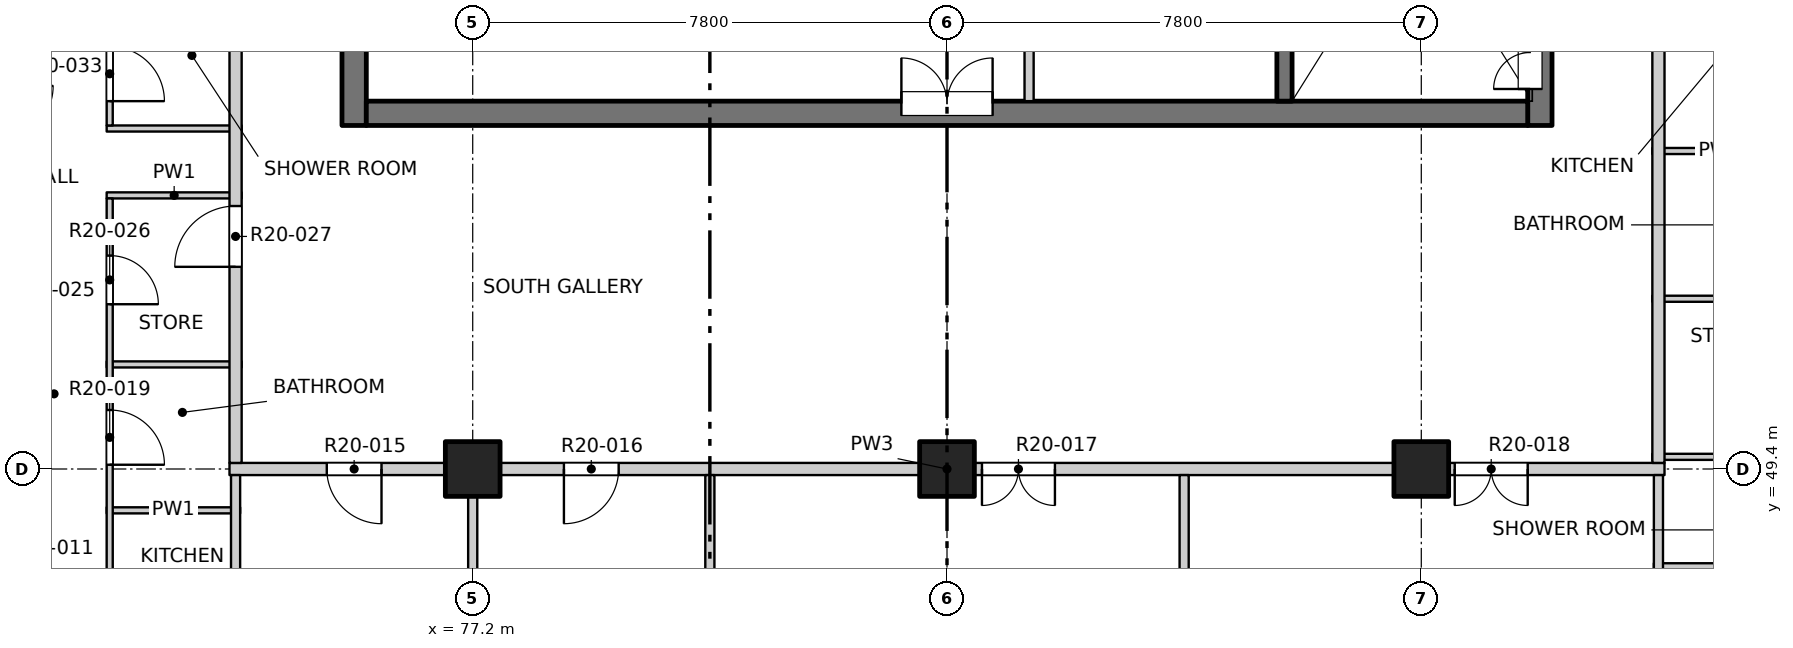
"""IFC4 building model, lengths in metres.
Left out: names, types, materials, properties, quantities, classifications, styles, units other than length and angle.
Written with IfcOpenShell. Run it as: python <this file> out.ifc"""

import sys

from ifc_helpers import new_model, si_unit, direction, frame, frame_2d, origin, origin_2d, place, context, subcontext, project, spatial, rectangle, extrude, element, fill, save


model = new_model("IFC4")
c1 = context("Model", 3, precision=1e-05, world=origin(), true_north=direction((0.0, 1.0)))
c2 = subcontext(c1, "Body", "Model", "MODEL_VIEW")
j1 = project(units=[si_unit("LENGTHUNIT", "METRE"), si_unit("PLANEANGLEUNIT", "RADIAN")], contexts=[c1])
p1 = place(None, origin())
s1 = spatial("IfcSite", under=j1, at=p1, CompositionType="ELEMENT")
p2 = place(p1, origin())
s2 = spatial("IfcBuilding", under=s1, at=p2, CompositionType="ELEMENT")
p3 = place(p2, frame((0.0, 0.0, 204.1)))
s3 = spatial("IfcBuildingStorey", under=s2, at=p3, CompositionType="ELEMENT", Elevation=204.1)
for number, where, z_axis, x_axis in (
    (1, (77.2, 49.4, -0.25), (0.0, 0.0, 1.0), (1.0, 0.0, 0.0)),
    (2, (85.0, 49.4, -0.25), (0.0, 0.0, 1.0), (1.0, 0.0, 0.0)),
    (3, (92.8, 49.4, -0.25), (0.0, 0.0, 1.0), (1.0, 0.0, 0.0)),
):
    element("IfcColumn", number, at=place(p3, frame(where, z_axis=z_axis, x_axis=x_axis)), inside=s3, PredefinedType="COLUMN", context=c2, shape_type="SweptSolid", body=[
        extrude(rectangle(XDim=0.9, YDim=0.9, at=origin_2d()), origin(), (0.0, 0.0, 1.0), 3.4),
    ])
p4 = place(p3, frame((75.25, 55.05, -0.25), z_axis=(0.0, 0.0, 1.0), x_axis=(0.0, 1.0, 0.0)))
e4 = element("IfcWall", 4, at=p4, inside=s3, PredefinedType="SOLIDWALL", context=c2, shape_type="SweptSolid", body=[
    extrude(rectangle(XDim=22.25, YDim=0.4, at=frame_2d((11.125, 0.0))), origin(), (0.0, 0.0, 1.0), 3.4),
])
p5 = place(p4, frame((7.4, 0.0, 0.25)))
e5 = element("IfcOpeningElement", 5, at=p5, cuts=e4, PredefinedType="OPENING", context=c2, shape_type="SweptSolid", body=[
    extrude(rectangle(XDim=0.9, YDim=2.1, at=frame_2d((0.45, 1.05))), frame((0.0, 0.21, 0.0), z_axis=(0.0, -1.0, 0.0), x_axis=(1.0, 0.0, 0.0)), (0.0, 0.0, 1.0), 0.42),
])
p6 = place(p4, frame((13.7, 0.0, 0.25)))
e6 = element("IfcOpeningElement", 6, at=p6, cuts=e4, PredefinedType="OPENING", context=c2, shape_type="SweptSolid", body=[
    extrude(rectangle(XDim=0.9, YDim=2.1, at=frame_2d((0.45, 1.05))), frame((0.0, 0.21, 0.0), z_axis=(0.0, -1.0, 0.0), x_axis=(1.0, 0.0, 0.0)), (0.0, 0.0, 1.0), 0.42),
])
p7 = place(p4, frame((20.0, 0.0, 0.25)))
e7 = element("IfcOpeningElement", 7, at=p7, cuts=e4, PredefinedType="OPENING", context=c2, shape_type="SweptSolid", body=[
    extrude(rectangle(XDim=0.9, YDim=2.1, at=frame_2d((0.45, 1.05))), frame((0.0, 0.21, 0.0), z_axis=(0.0, -1.0, 0.0), x_axis=(1.0, 0.0, 0.0)), (0.0, 0.0, 1.0), 0.42),
])
p8 = place(p3, frame((94.75, 55.05, -0.25), z_axis=(0.0, 0.0, 1.0), x_axis=(0.0, 1.0, 0.0)))
e8 = element("IfcWall", 8, at=p8, inside=s3, PredefinedType="SOLIDWALL", context=c2, shape_type="SweptSolid", body=[
    extrude(rectangle(XDim=6.9, YDim=0.4, at=frame_2d((3.45, 0.0))), origin(), (0.0, 0.0, 1.0), 3.4),
])
p9 = place(p8, frame((0.6, 0.0, 0.25)))
e9 = element("IfcOpeningElement", 9, at=p9, cuts=e8, PredefinedType="OPENING", context=c2, shape_type="SweptSolid", body=[
    extrude(rectangle(XDim=1.2, YDim=2.1, at=frame_2d((0.6, 1.05))), frame((0.0, 0.21, 0.0), z_axis=(0.0, -1.0, 0.0), x_axis=(1.0, 0.0, 0.0)), (0.0, 0.0, 1.0), 0.42),
])
p10 = place(p3, frame((75.45, 55.25, -0.25), z_axis=(0.0, 0.0, 1.0), x_axis=(1.0, 0.0, 0.0)))
e10 = element("IfcWall", 10, at=p10, inside=s3, PredefinedType="SOLIDWALL", context=c2, shape_type="SweptSolid", body=[
    extrude(rectangle(XDim=19.1, YDim=0.4, at=frame_2d((9.55, 0.0))), origin(), (0.0, 0.0, 1.0), 3.4),
])
p11 = place(p10, frame((8.8, 0.0, 0.25)))
e11 = element("IfcOpeningElement", 11, at=p11, cuts=e10, PredefinedType="OPENING", context=c2, shape_type="SweptSolid", body=[
    extrude(rectangle(XDim=1.5, YDim=2.1, at=frame_2d((0.75, 1.05))), frame((0.0, 0.21, 0.0), z_axis=(0.0, -1.0, 0.0), x_axis=(1.0, 0.0, 0.0)), (0.0, 0.0, 1.0), 0.42),
])
p12 = place(p3, frame((90.55, 55.45, -0.25), z_axis=(0.0, 0.0, 1.0), x_axis=(0.0, 1.0, 0.0)))
e12 = element("IfcWall", 12, at=p12, inside=s3, PredefinedType="SOLIDWALL", context=c2, shape_type="SweptSolid", body=[
    extrude(rectangle(XDim=6.5, YDim=0.25, at=frame_2d((3.25, 0.0))), origin(), (0.0, 0.0, 1.0), 3.4),
])
p13 = place(p3, frame((96.625, 47.8, 0.0), z_axis=(0.0, 0.0, 1.0), x_axis=(1.0, 0.0, 0.0)))
e13 = element("IfcWall", 13, at=p13, inside=s3, PredefinedType="PARTITIONING", context=c2, shape_type="SweptSolid", body=[
    extrude(rectangle(XDim=2.195, YDim=0.1, at=frame_2d((1.098, 0.0))), origin(), (0.0, 0.0, 1.0), 3.15),
])
p14 = place(p3, frame((71.18, 48.72, 0.0), z_axis=(0.0, 0.0, 1.0), x_axis=(1.0, 0.0, 0.0)))
e14 = element("IfcWall", 14, at=p14, inside=s3, PredefinedType="PARTITIONING", context=c2, shape_type="SweptSolid", body=[
    extrude(rectangle(XDim=2.195, YDim=0.1, at=frame_2d((1.097, 0.0))), origin(), (0.0, 0.0, 1.0), 3.15),
])
p15 = place(p3, frame((73.2, 49.4, 0.0), z_axis=(0.0, 0.0, 1.0), x_axis=(1.0, 0.0, 0.0)))
e15 = element("IfcWall", 15, at=p15, inside=s3, PredefinedType="PARTITIONING", context=c2, shape_type="SweptSolid", body=[
    extrude(rectangle(XDim=23.6, YDim=0.2, at=frame_2d((11.8, 0.0))), origin(), (0.0, 0.0, 1.0), 3.15),
])
p16 = place(p15, frame((1.6, 0.0, 0.0)))
e16 = element("IfcOpeningElement", 16, at=p16, cuts=e15, PredefinedType="OPENING", context=c2, shape_type="SweptSolid", body=[
    extrude(rectangle(XDim=0.9, YDim=2.1, at=frame_2d((0.45, 1.05))), frame((0.0, 0.11, 0.0), z_axis=(0.0, -1.0, 0.0), x_axis=(1.0, 0.0, 0.0)), (0.0, 0.0, 1.0), 0.22),
])
p17 = place(p15, frame((5.5, 0.0, 0.0)))
e17 = element("IfcOpeningElement", 17, at=p17, cuts=e15, PredefinedType="OPENING", context=c2, shape_type="SweptSolid", body=[
    extrude(rectangle(XDim=0.9, YDim=2.1, at=frame_2d((0.45, 1.05))), frame((0.0, 0.11, 0.0), z_axis=(0.0, -1.0, 0.0), x_axis=(1.0, 0.0, 0.0)), (0.0, 0.0, 1.0), 0.22),
])
p18 = place(p15, frame((12.375, 0.0, 0.0)))
e18 = element("IfcOpeningElement", 18, at=p18, cuts=e15, PredefinedType="OPENING", context=c2, shape_type="SweptSolid", body=[
    extrude(rectangle(XDim=1.2, YDim=2.1, at=frame_2d((0.6, 1.05))), frame((0.0, 0.11, 0.0), z_axis=(0.0, -1.0, 0.0), x_axis=(1.0, 0.0, 0.0)), (0.0, 0.0, 1.0), 0.22),
])
p19 = place(p15, frame((20.15, 0.0, 0.0)))
e19 = element("IfcOpeningElement", 19, at=p19, cuts=e15, PredefinedType="OPENING", context=c2, shape_type="SweptSolid", body=[
    extrude(rectangle(XDim=1.2, YDim=2.1, at=frame_2d((0.6, 1.05))), frame((0.0, 0.11, 0.0), z_axis=(0.0, -1.0, 0.0), x_axis=(1.0, 0.0, 0.0)), (0.0, 0.0, 1.0), 0.22),
])
for number, where, z_axis, x_axis in (
    (20, (96.6, 49.6, 0.0), (0.0, 0.0, 1.0), (1.0, 0.0, 0.0)),
    (21, (71.18, 51.12, 0.0), (0.0, 0.0, 1.0), (1.0, 0.0, 0.0)),
    (22, (96.6, 52.2, 0.0), (0.0, 0.0, 1.0), (1.0, 0.0, 0.0)),
    (23, (71.18, 53.9, 0.0), (0.0, 0.0, 1.0), (1.0, 0.0, 0.0)),
    (24, (96.6, 54.63, 0.0), (0.0, 0.0, 1.0), (1.0, 0.0, 0.0)),
    (25, (71.18, 55.0, 0.0), (0.0, 0.0, 1.0), (1.0, 0.0, 0.0)),
):
    element("IfcWall", number, at=place(p3, frame(where, z_axis=z_axis, x_axis=x_axis)), inside=s3, PredefinedType="PARTITIONING", context=c2, shape_type="SweptSolid", body=[
        extrude(rectangle(XDim=2.22, YDim=0.1, at=frame_2d((1.11, 0.0))), origin(), (0.0, 0.0, 1.0), 3.15),
    ])
p20 = place(p3, frame((71.23, 45.55, 0.0), z_axis=(0.0, 0.0, 1.0), x_axis=(0.0, 1.0, 0.0)))
e26 = element("IfcWall", 26, at=p20, inside=s3, PredefinedType="PARTITIONING", context=c2, shape_type="SweptSolid", body=[
    extrude(rectangle(XDim=8.3, YDim=0.1, at=frame_2d((4.15, 0.0))), origin(), (0.0, 0.0, 1.0), 3.15),
])
p21 = place(p20, frame((1.11, 0.0, 0.0)))
e27 = element("IfcOpeningElement", 27, at=p21, cuts=e26, PredefinedType="OPENING", context=c2, shape_type="SweptSolid", body=[
    extrude(rectangle(XDim=0.9, YDim=2.1, at=frame_2d((0.45, 1.05))), frame((0.0, 0.06, 0.0), z_axis=(0.0, -1.0, 0.0), x_axis=(1.0, 0.0, 0.0)), (0.0, 0.0, 1.0), 0.12),
])
p22 = place(p20, frame((3.92, 0.0, 0.0)))
e28 = element("IfcOpeningElement", 28, at=p22, cuts=e26, PredefinedType="OPENING", context=c2, shape_type="SweptSolid", body=[
    extrude(rectangle(XDim=0.9, YDim=2.1, at=frame_2d((0.45, 1.05))), frame((0.0, 0.06, 0.0), z_axis=(0.0, -1.0, 0.0), x_axis=(1.0, 0.0, 0.0)), (0.0, 0.0, 1.0), 0.12),
])
p23 = place(p20, frame((6.56, 0.0, 0.0)))
e29 = element("IfcOpeningElement", 29, at=p23, cuts=e26, PredefinedType="OPENING", context=c2, shape_type="SweptSolid", body=[
    extrude(rectangle(XDim=0.8, YDim=2.1, at=frame_2d((0.4, 1.05))), frame((0.0, 0.06, 0.0), z_axis=(0.0, -1.0, 0.0), x_axis=(1.0, 0.0, 0.0)), (0.0, 0.0, 1.0), 0.12),
])
p24 = place(p3, frame((71.23, 55.05, 0.0), z_axis=(0.0, 0.0, 1.0), x_axis=(0.0, 1.0, 0.0)))
e30 = element("IfcWall", 30, at=p24, inside=s3, PredefinedType="PARTITIONING", context=c2, shape_type="SweptSolid", body=[
    extrude(rectangle(XDim=18.25, YDim=0.1, at=frame_2d((9.125, 0.0))), origin(), (0.0, 0.0, 1.0), 3.15),
])
p25 = place(p24, frame((0.4, 0.0, 0.0)))
e31 = element("IfcOpeningElement", 31, at=p25, cuts=e30, PredefinedType="OPENING", context=c2, shape_type="SweptSolid", body=[
    extrude(rectangle(XDim=0.9, YDim=2.1, at=frame_2d((0.45, 1.05))), frame((0.0, 0.06, 0.0), z_axis=(0.0, -1.0, 0.0), x_axis=(1.0, 0.0, 0.0)), (0.0, 0.0, 1.0), 0.12),
])
p26 = place(p24, frame((2.425, 0.0, 0.0)))
e32 = element("IfcOpeningElement", 32, at=p26, cuts=e30, PredefinedType="OPENING", context=c2, shape_type="SweptSolid", body=[
    extrude(rectangle(XDim=0.8, YDim=2.1, at=frame_2d((0.4, 1.05))), frame((0.0, 0.06, 0.0), z_axis=(0.0, -1.0, 0.0), x_axis=(1.0, 0.0, 0.0)), (0.0, 0.0, 1.0), 0.12),
])
p27 = place(p24, frame((4.575, 0.0, 0.0)))
e33 = element("IfcOpeningElement", 33, at=p27, cuts=e30, PredefinedType="OPENING", context=c2, shape_type="SweptSolid", body=[
    extrude(rectangle(XDim=0.8, YDim=2.1, at=frame_2d((0.4, 1.05))), frame((0.0, 0.06, 0.0), z_axis=(0.0, -1.0, 0.0), x_axis=(1.0, 0.0, 0.0)), (0.0, 0.0, 1.0), 0.12),
])
p28 = place(p24, frame((6.875, 0.0, 0.0)))
e34 = element("IfcOpeningElement", 34, at=p28, cuts=e30, PredefinedType="OPENING", context=c2, shape_type="SweptSolid", body=[
    extrude(rectangle(XDim=0.8, YDim=2.1, at=frame_2d((0.4, 1.05))), frame((0.0, 0.06, 0.0), z_axis=(0.0, -1.0, 0.0), x_axis=(1.0, 0.0, 0.0)), (0.0, 0.0, 1.0), 0.12),
])
p29 = place(p24, frame((9.25, 0.0, 0.0)))
e35 = element("IfcOpeningElement", 35, at=p29, cuts=e30, PredefinedType="OPENING", context=c2, shape_type="SweptSolid", body=[
    extrude(rectangle(XDim=0.8, YDim=2.1, at=frame_2d((0.4, 1.05))), frame((0.0, 0.06, 0.0), z_axis=(0.0, -1.0, 0.0), x_axis=(1.0, 0.0, 0.0)), (0.0, 0.0, 1.0), 0.12),
])
p30 = place(p24, frame((11.7, 0.0, 0.0)))
e36 = element("IfcOpeningElement", 36, at=p30, cuts=e30, PredefinedType="OPENING", context=c2, shape_type="SweptSolid", body=[
    extrude(rectangle(XDim=0.8, YDim=2.1, at=frame_2d((0.4, 1.05))), frame((0.0, 0.06, 0.0), z_axis=(0.0, -1.0, 0.0), x_axis=(1.0, 0.0, 0.0)), (0.0, 0.0, 1.0), 0.12),
])
p31 = place(p24, frame((13.865, 0.0, 0.0)))
e37 = element("IfcOpeningElement", 37, at=p31, cuts=e30, PredefinedType="OPENING", context=c2, shape_type="SweptSolid", body=[
    extrude(rectangle(XDim=0.9, YDim=2.1, at=frame_2d((0.45, 1.05))), frame((0.0, 0.06, 0.0), z_axis=(0.0, -1.0, 0.0), x_axis=(1.0, 0.0, 0.0)), (0.0, 0.0, 1.0), 0.12),
])
p32 = place(p24, frame((16.315, 0.0, 0.0)))
e38 = element("IfcOpeningElement", 38, at=p32, cuts=e30, PredefinedType="OPENING", context=c2, shape_type="SweptSolid", body=[
    extrude(rectangle(XDim=0.9, YDim=2.1, at=frame_2d((0.45, 1.05))), frame((0.0, 0.06, 0.0), z_axis=(0.0, -1.0, 0.0), x_axis=(1.0, 0.0, 0.0)), (0.0, 0.0, 1.0), 0.12),
])
p33 = place(p3, frame((73.3, 41.9, 0.0), z_axis=(0.0, 0.0, 1.0), x_axis=(0.0, 1.0, 0.0)))
e39 = element("IfcWall", 39, at=p33, inside=s3, PredefinedType="PARTITIONING", context=c2, shape_type="SweptSolid", body=[
    extrude(rectangle(XDim=7.4, YDim=0.15, at=frame_2d((3.7, 0.0))), origin(), (0.0, 0.0, 1.0), 3.15),
])
p34 = place(p3, frame((73.3, 49.5, 0.0), z_axis=(0.0, 0.0, 1.0), x_axis=(0.0, 1.0, 0.0)))
e40 = element("IfcWall", 40, at=p34, inside=s3, PredefinedType="PARTITIONING", context=c2, shape_type="SweptSolid", body=[
    extrude(rectangle(XDim=34.9, YDim=0.2, at=frame_2d((17.45, 0.0))), origin(), (0.0, 0.0, 1.0), 3.15),
])
p35 = place(p34, frame((3.225, 0.0, 0.0)))
e41 = element("IfcOpeningElement", 41, at=p35, cuts=e40, PredefinedType="OPENING", context=c2, shape_type="SweptSolid", body=[
    extrude(rectangle(XDim=1.0, YDim=2.1, at=frame_2d((0.5, 1.05))), frame((0.0, 0.11, 0.0), z_axis=(0.0, -1.0, 0.0), x_axis=(1.0, 0.0, 0.0)), (0.0, 0.0, 1.0), 0.22),
])
p36 = place(p34, frame((25.125, 0.0, 0.0)))
e42 = element("IfcOpeningElement", 42, at=p36, cuts=e40, PredefinedType="OPENING", context=c2, shape_type="SweptSolid", body=[
    extrude(rectangle(XDim=1.0, YDim=2.1, at=frame_2d((0.5, 1.05))), frame((0.0, 0.11, 0.0), z_axis=(0.0, -1.0, 0.0), x_axis=(1.0, 0.0, 0.0)), (0.0, 0.0, 1.0), 0.22),
])
p37 = place(p34, frame((31.475, 0.0, 0.0)))
e43 = element("IfcOpeningElement", 43, at=p37, cuts=e40, PredefinedType="OPENING", context=c2, shape_type="SweptSolid", body=[
    extrude(rectangle(XDim=1.0, YDim=2.1, at=frame_2d((0.5, 1.05))), frame((0.0, 0.11, 0.0), z_axis=(0.0, -1.0, 0.0), x_axis=(1.0, 0.0, 0.0)), (0.0, 0.0, 1.0), 0.22),
])
p38 = place(p3, frame((77.2, 41.9, 0.0), z_axis=(0.0, 0.0, 1.0), x_axis=(0.0, 1.0, 0.0)))
e44 = element("IfcWall", 44, at=p38, inside=s3, PredefinedType="PARTITIONING", context=c2, shape_type="SweptSolid", body=[
    extrude(rectangle(XDim=7.4, YDim=0.15, at=frame_2d((3.7, 0.0))), origin(), (0.0, 0.0, 1.0), 3.15),
])
p39 = place(p3, frame((81.1, 41.9, 0.0), z_axis=(0.0, 0.0, 1.0), x_axis=(0.0, 1.0, 0.0)))
e45 = element("IfcWall", 45, at=p39, inside=s3, PredefinedType="PARTITIONING", context=c2, shape_type="SweptSolid", body=[
    extrude(rectangle(XDim=7.4, YDim=0.15, at=frame_2d((3.7, 0.0))), origin(), (0.0, 0.0, 1.0), 2.55),
])
p40 = place(p3, frame((86.35, 55.45, 0.0), z_axis=(0.0, 0.0, 1.0), x_axis=(0.0, 1.0, 0.0)))
e46 = element("IfcWall", 46, at=p40, inside=s3, PredefinedType="PARTITIONING", context=c2, shape_type="SweptSolid", body=[
    extrude(rectangle(XDim=5.575, YDim=0.15, at=frame_2d((2.788, 0.0))), origin(), (0.0, 0.0, 1.0), 3.15),
])
p41 = place(p40, frame((2.25, 0.0, 0.0)))
e47 = element("IfcOpeningElement", 47, at=p41, cuts=e46, PredefinedType="OPENING", context=c2, shape_type="SweptSolid", body=[
    extrude(rectangle(XDim=0.9, YDim=2.1, at=frame_2d((0.45, 1.05))), frame((0.0, 0.085, 0.0), z_axis=(0.0, -1.0, 0.0), x_axis=(1.0, 0.0, 0.0)), (0.0, 0.0, 1.0), 0.17),
])
p42 = place(p3, frame((88.9, 41.9, 0.0), z_axis=(0.0, 0.0, 1.0), x_axis=(0.0, 1.0, 0.0)))
e48 = element("IfcWall", 48, at=p42, inside=s3, PredefinedType="PARTITIONING", context=c2, shape_type="SweptSolid", body=[
    extrude(rectangle(XDim=7.4, YDim=0.15, at=frame_2d((3.7, 0.0))), origin(), (0.0, 0.0, 1.0), 2.55),
])
p43 = place(p3, frame((96.7, 41.9, 0.0), z_axis=(0.0, 0.0, 1.0), x_axis=(0.0, 1.0, 0.0)))
e49 = element("IfcWall", 49, at=p43, inside=s3, PredefinedType="PARTITIONING", context=c2, shape_type="SweptSolid", body=[
    extrude(rectangle(XDim=7.4, YDim=0.15, at=frame_2d((3.7, 0.0))), origin(), (0.0, 0.0, 1.0), 3.15),
])
p44 = place(p3, frame((96.7, 49.5, 0.0), z_axis=(0.0, 0.0, 1.0), x_axis=(0.0, 1.0, 0.0)))
e50 = element("IfcWall", 50, at=p44, inside=s3, PredefinedType="PARTITIONING", context=c2, shape_type="SweptSolid", body=[
    extrude(rectangle(XDim=34.9, YDim=0.2, at=frame_2d((17.45, 0.0))), origin(), (0.0, 0.0, 1.0), 3.15),
])
p45 = place(p44, frame((9.625, 0.0, 0.0)))
e51 = element("IfcOpeningElement", 51, at=p45, cuts=e50, PredefinedType="OPENING", context=c2, shape_type="SweptSolid", body=[
    extrude(rectangle(XDim=1.0, YDim=2.1, at=frame_2d((0.5, 1.05))), frame((0.0, 0.11, 0.0), z_axis=(0.0, -1.0, 0.0), x_axis=(1.0, 0.0, 0.0)), (0.0, 0.0, 1.0), 0.22),
])
p46 = place(p44, frame((14.125, 0.0, 0.0)))
e52 = element("IfcOpeningElement", 52, at=p46, cuts=e50, PredefinedType="OPENING", context=c2, shape_type="SweptSolid", body=[
    extrude(rectangle(XDim=1.0, YDim=2.1, at=frame_2d((0.5, 1.05))), frame((0.0, 0.11, 0.0), z_axis=(0.0, -1.0, 0.0), x_axis=(1.0, 0.0, 0.0)), (0.0, 0.0, 1.0), 0.22),
])
p47 = place(p44, frame((29.275, 0.0, 0.0)))
e53 = element("IfcOpeningElement", 53, at=p47, cuts=e50, PredefinedType="OPENING", context=c2, shape_type="SweptSolid", body=[
    extrude(rectangle(XDim=1.0, YDim=2.1, at=frame_2d((0.5, 1.05))), frame((0.0, 0.11, 0.0), z_axis=(0.0, -1.0, 0.0), x_axis=(1.0, 0.0, 0.0)), (0.0, 0.0, 1.0), 0.22),
])
p48 = place(p16, origin())
e54 = element("IfcDoor", 54, at=p48, inside=s3, OperationType="SINGLE_SWING_LEFT", PredefinedType="DOOR", context=c2, shape_type="SweptSolid", body=[
    extrude(rectangle(XDim=0.9, YDim=2.1, at=frame_2d((0.45, 1.05))), frame((0.0, 0.025, 0.0), z_axis=(0.0, -1.0, 0.0), x_axis=(1.0, 0.0, 0.0)), (0.0, 0.0, 1.0), 0.05),
])
fill(e16, e54)
p49 = place(p17, origin())
e55 = element("IfcDoor", 55, at=p49, inside=s3, OperationType="SINGLE_SWING_RIGHT", PredefinedType="DOOR", context=c2, shape_type="SweptSolid", body=[
    extrude(rectangle(XDim=0.9, YDim=2.1, at=frame_2d((0.45, 1.05))), frame((0.0, 0.025, 0.0), z_axis=(0.0, -1.0, 0.0), x_axis=(1.0, 0.0, 0.0)), (0.0, 0.0, 1.0), 0.05),
])
fill(e17, e55)
p50 = place(p18, origin())
e56 = element("IfcDoor", 56, at=p50, inside=s3, OperationType="DOUBLE_DOOR_SINGLE_SWING", PredefinedType="DOOR", context=c2, shape_type="SweptSolid", body=[
    extrude(rectangle(XDim=1.2, YDim=2.1, at=frame_2d((0.6, 1.05))), frame((0.0, 0.025, 0.0), z_axis=(0.0, -1.0, 0.0), x_axis=(1.0, 0.0, 0.0)), (0.0, 0.0, 1.0), 0.05),
])
fill(e18, e56)
p51 = place(p19, origin())
e57 = element("IfcDoor", 57, at=p51, inside=s3, OperationType="DOUBLE_DOOR_SINGLE_SWING", PredefinedType="DOOR", context=c2, shape_type="SweptSolid", body=[
    extrude(rectangle(XDim=1.2, YDim=2.1, at=frame_2d((0.6, 1.05))), frame((0.0, 0.025, 0.0), z_axis=(0.0, -1.0, 0.0), x_axis=(1.0, 0.0, 0.0)), (0.0, 0.0, 1.0), 0.05),
])
fill(e19, e57)
p52 = place(p22, origin())
e58 = element("IfcDoor", 58, at=p52, inside=s3, OperationType="SINGLE_SWING_RIGHT", PredefinedType="DOOR", context=c2, shape_type="SweptSolid", body=[
    extrude(rectangle(XDim=0.9, YDim=2.1, at=frame_2d((0.45, 1.05))), frame((0.0, 0.025, 0.0), z_axis=(0.0, -1.0, 0.0), x_axis=(1.0, 0.0, 0.0)), (0.0, 0.0, 1.0), 0.05),
])
fill(e28, e58)
p53 = place(p23, origin())
e59 = element("IfcDoor", 59, at=p53, inside=s3, OperationType="SINGLE_SWING_RIGHT", PredefinedType="DOOR", context=c2, shape_type="SweptSolid", body=[
    extrude(rectangle(XDim=0.8, YDim=2.1, at=frame_2d((0.4, 1.05))), frame((0.0, 0.025, 0.0), z_axis=(0.0, -1.0, 0.0), x_axis=(1.0, 0.0, 0.0)), (0.0, 0.0, 1.0), 0.05),
])
fill(e29, e59)
p54 = place(p35, origin())
e60 = element("IfcDoor", 60, at=p54, inside=s3, OperationType="SINGLE_SWING_LEFT", PredefinedType="DOOR", context=c2, shape_type="SweptSolid", body=[
    extrude(rectangle(XDim=1.0, YDim=2.1, at=frame_2d((0.5, 1.05))), frame((0.0, 0.025, 0.0), z_axis=(0.0, -1.0, 0.0), x_axis=(1.0, 0.0, 0.0)), (0.0, 0.0, 1.0), 0.05),
])
fill(e41, e60)
p55 = place(p11, origin())
e61 = element("IfcDoor", 61, at=p55, inside=s3, OperationType="DOUBLE_DOOR_SINGLE_SWING", PredefinedType="DOOR", context=c2, shape_type="SweptSolid", body=[
    extrude(rectangle(XDim=1.5, YDim=2.1, at=frame_2d((0.75, 1.05))), frame((0.0, 0.185, 0.0), z_axis=(0.0, -1.0, 0.0), x_axis=(1.0, 0.0, 0.0)), (0.0, 0.0, 1.0), 0.05),
])
fill(e11, e61)
p56 = place(p25, origin())
e62 = element("IfcDoor", 62, at=p56, inside=s3, OperationType="SINGLE_SWING_RIGHT", PredefinedType="DOOR", context=c2, shape_type="SweptSolid", body=[
    extrude(rectangle(XDim=0.9, YDim=2.1, at=frame_2d((0.45, 1.05))), frame((0.0, 0.025, 0.0), z_axis=(0.0, -1.0, 0.0), x_axis=(1.0, 0.0, 0.0)), (0.0, 0.0, 1.0), 0.05),
])
fill(e31, e62)
p57 = place(p9, origin())
e63 = element("IfcDoor", 63, at=p57, inside=s3, OperationType="DOUBLE_DOOR_SINGLE_SWING", PredefinedType="DOOR", context=c2, shape_type="SweptSolid", body=[
    extrude(rectangle(XDim=1.2, YDim=2.1, at=frame_2d((0.6, 1.05))), frame((0.0, 0.185, 0.0), z_axis=(0.0, -1.0, 0.0), x_axis=(1.0, 0.0, 0.0)), (0.0, 0.0, 1.0), 0.05),
])
fill(e9, e63)
save(model, sys.argv[1])
